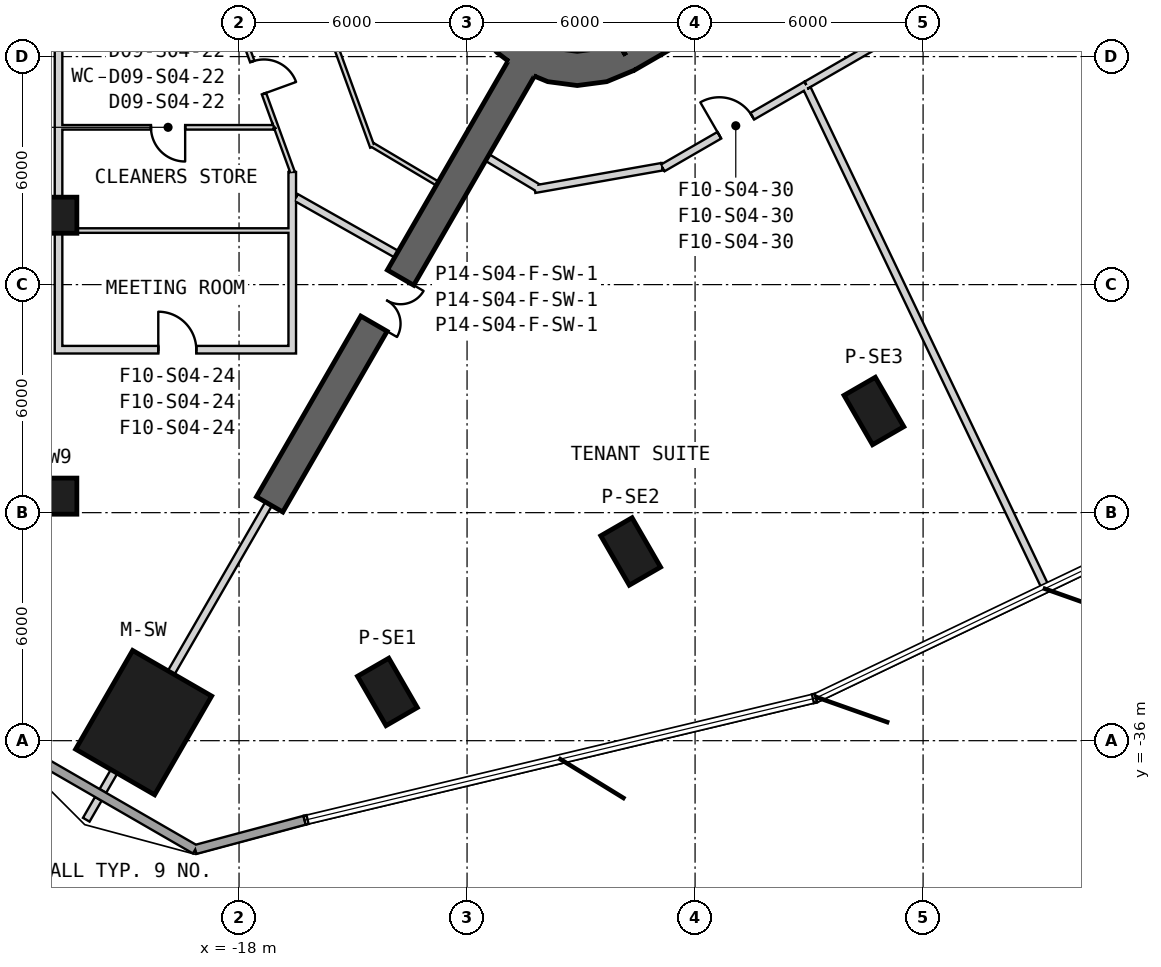
"""IFC4 building model, lengths in metres.
Left out: names, types, materials, properties, quantities, classifications, styles, units other than length and angle.
Written with IfcOpenShell. Run it as: python <this file> out.ifc"""

import sys

from ifc_helpers import new_model, si_unit, direction, frame, frame_2d, origin, origin_2d, place, context, subcontext, project, spatial, polyline, rectangle, outline, extrude, element, fill, save


model = new_model("IFC4")
c1 = context("Model", 3, precision=1e-05, world=origin(), true_north=direction((0.0, 1.0)))
c2 = subcontext(c1, "Body", "Model", "MODEL_VIEW")
j1 = project(units=[si_unit("LENGTHUNIT", "METRE"), si_unit("PLANEANGLEUNIT", "RADIAN")], contexts=[c1])
p1 = place(None, origin())
s1 = spatial("IfcSite", under=j1, at=p1, CompositionType="ELEMENT")
p2 = place(p1, origin())
s2 = spatial("IfcBuilding", under=s1, at=p2, CompositionType="ELEMENT")
p3 = place(p2, frame((0.0, 0.0, 94.7)))
s3 = spatial("IfcBuildingStorey", under=s2, at=p3, CompositionType="ELEMENT", Elevation=94.7)
p4 = place(p3, frame((-20.51, -35.525, 0.0), z_axis=(0.0, 0.0, 1.0), x_axis=(-0.5, -0.866025403784, 0.0)))
e1 = element("IfcColumn", 1, at=p4, inside=s3, PredefinedType="COLUMN", context=c2, shape_type="SweptSolid", body=[
    extrude(rectangle(XDim=3.0, YDim=2.4, at=origin_2d()), origin(), (0.0, 0.0, 1.0), 4.1),
])
for number, where, z_axis, x_axis in (
    (2, (-23.018, -22.174, 0.0), (0.0, 0.0, 1.0), (-1.0, 0.0, 0.0)),
    (3, (-23.018, -29.566, 0.0), (0.0, 0.0, 1.0), (-1.0, 0.0, 0.0)),
    (4, (-14.096, -34.717, 0.0), (0.0, 0.0, 1.0), (0.5, -0.866, 0.0)),
    (5, (-7.695, -31.021, 0.0), (0.0, 0.0, 1.0), (0.5, -0.866, 0.0)),
    (6, (-1.293, -27.326, 0.0), (0.0, 0.0, 1.0), (0.5, -0.866, 0.0)),
):
    element("IfcColumn", number, at=place(p3, frame(where, z_axis=z_axis, x_axis=x_axis)), inside=s3, PredefinedType="COLUMN", context=c2, shape_type="SweptSolid", body=[
        extrude(rectangle(XDim=1.5, YDim=0.95, at=origin_2d()), origin(), (0.0, 0.0, 1.0), 4.1),
    ])
p5 = place(p3, frame((-7.825, -17.97, 0.0), z_axis=(0.0, 0.0, 1.0), x_axis=(0.866028369851, 0.499994862586, 0.0)))
e7 = element("IfcWall", 7, at=p5, inside=s3, PredefinedType="SHEAR", context=c2, shape_type="SweptSolid", body=[
    extrude(rectangle(XDim=31.523, YDim=0.9, at=frame_2d((15.762, 0.0))), origin(), (0.0, 0.0, 1.0), 4.1),
])
p6 = place(p5, frame((7.062, 0.0, 0.0)))
e8 = element("IfcOpeningElement", 8, at=p6, cuts=e7, PredefinedType="OPENING", context=c2, shape_type="SweptSolid", body=[
    extrude(rectangle(XDim=1.2, YDim=2.4, at=frame_2d((0.6, 1.2))), frame((0.0, 0.46, 0.0), z_axis=(0.0, -1.0, 0.0), x_axis=(1.0, 0.0, 0.0)), (0.0, 0.0, 1.0), 0.92),
])
p7 = place(p5, frame((9.762, 0.0, 0.0)))
e9 = element("IfcOpeningElement", 9, at=p7, cuts=e7, PredefinedType="OPENING", context=c2, shape_type="SweptSolid", body=[
    extrude(rectangle(XDim=1.2, YDim=2.4, at=frame_2d((0.6, 1.2))), frame((0.0, 0.46, 0.0), z_axis=(0.0, -1.0, 0.0), x_axis=(1.0, 0.0, 0.0)), (0.0, 0.0, 1.0), 0.92),
])
p8 = place(p5, frame((12.462, 0.0, 0.0)))
e10 = element("IfcOpeningElement", 10, at=p8, cuts=e7, PredefinedType="OPENING", context=c2, shape_type="SweptSolid", body=[
    extrude(rectangle(XDim=1.2, YDim=2.4, at=frame_2d((0.6, 1.2))), frame((0.0, 0.46, 0.0), z_axis=(0.0, -1.0, 0.0), x_axis=(1.0, 0.0, 0.0)), (0.0, 0.0, 1.0), 0.92),
])
p9 = place(p5, frame((15.162, 0.0, 0.0)))
e11 = element("IfcOpeningElement", 11, at=p9, cuts=e7, PredefinedType="OPENING", context=c2, shape_type="SweptSolid", body=[
    extrude(rectangle(XDim=1.2, YDim=2.4, at=frame_2d((0.6, 1.2))), frame((0.0, 0.46, 0.0), z_axis=(0.0, -1.0, 0.0), x_axis=(1.0, 0.0, 0.0)), (0.0, 0.0, 1.0), 0.92),
])
p10 = place(p5, frame((17.862, 0.0, 0.0)))
e12 = element("IfcOpeningElement", 12, at=p10, cuts=e7, PredefinedType="OPENING", context=c2, shape_type="SweptSolid", body=[
    extrude(rectangle(XDim=1.2, YDim=2.4, at=frame_2d((0.6, 1.2))), frame((0.0, 0.46, 0.0), z_axis=(0.0, -1.0, 0.0), x_axis=(1.0, 0.0, 0.0)), (0.0, 0.0, 1.0), 0.92),
])
p11 = place(p5, frame((20.562, 0.0, 0.0)))
e13 = element("IfcOpeningElement", 13, at=p11, cuts=e7, PredefinedType="OPENING", context=c2, shape_type="SweptSolid", body=[
    extrude(rectangle(XDim=1.2, YDim=2.4, at=frame_2d((0.6, 1.2))), frame((0.0, 0.46, 0.0), z_axis=(0.0, -1.0, 0.0), x_axis=(1.0, 0.0, 0.0)), (0.0, 0.0, 1.0), 0.92),
])
p12 = place(p5, frame((26.712, 0.0, 0.0)))
e14 = element("IfcOpeningElement", 14, at=p12, cuts=e7, PredefinedType="OPENING", context=c2, shape_type="SweptSolid", body=[
    extrude(rectangle(XDim=1.2, YDim=2.4, at=frame_2d((0.6, 1.2))), frame((0.0, 0.46, 0.0), z_axis=(0.0, -1.0, 0.0), x_axis=(1.0, 0.0, 0.0)), (0.0, 0.0, 1.0), 0.92),
])
p13 = place(p5, frame((3.612, 0.0, 0.0)))
e15 = element("IfcOpeningElement", 15, at=p13, cuts=e7, PredefinedType="OPENING", context=c2, shape_type="SweptSolid", body=[
    extrude(rectangle(XDim=1.2, YDim=2.4, at=frame_2d((0.6, 1.2))), frame((0.0, 0.46, 0.0), z_axis=(0.0, -1.0, 0.0), x_axis=(1.0, 0.0, 0.0)), (0.0, 0.0, 1.0), 0.92),
])
p14 = place(p3, origin())
e16 = element("IfcWall", 16, at=p14, inside=s3, PredefinedType="SHEAR", context=c2, shape_type="SweptSolid", body=[
    extrude(outline(polyline([(-12.1, -15.762), (-11.998, -16.538), (-11.698, -17.262), (-11.221, -17.883), (-10.6, -18.36), (-9.876, -18.659), (-9.1, -18.762), (-8.323, -18.659), (-7.6, -18.36), (-8.05, -17.58), (-8.556, -17.79), (-9.1, -17.862), (-9.644, -17.79), (-10.15, -17.58), (-10.585, -17.247), (-10.919, -16.812), (-11.128, -16.305), (-11.2, -15.762), (-12.1, -15.762)])), origin(), (0.0, 0.0, 1.0), 4.1),
])
p15 = place(p3, frame((-10.575, -18.316, 0.0), z_axis=(0.0, 0.0, 1.0), x_axis=(-0.500006018292, -0.866021929094, 0.0)))
e17 = element("IfcWall", 17, at=p15, inside=s3, PredefinedType="SHEAR", context=c2, shape_type="SweptSolid", body=[
    extrude(rectangle(XDim=13.241, YDim=0.8, at=frame_2d((6.621, 0.0))), origin(), (0.0, 0.0, 1.0), 4.1),
])
p16 = place(p15, frame((6.35, 0.0, 0.0)))
e18 = element("IfcOpeningElement", 18, at=p16, cuts=e17, PredefinedType="OPENING", context=c2, shape_type="SweptSolid", body=[
    extrude(rectangle(XDim=1.4, YDim=2.4, at=frame_2d((0.7, 1.2))), frame((0.0, 0.41, 0.0), z_axis=(0.0, -1.0, 0.0), x_axis=(1.0, 0.0, 0.0)), (0.0, 0.0, 1.0), 0.82),
])
p17 = place(p3, frame((-24.081, -36.019, 0.0), z_axis=(0.0, 0.0, 1.0), x_axis=(0.866024844342, -0.500000968981, 0.0)))
e19 = element("IfcWall", 19, at=p17, inside=s3, PredefinedType="SOLIDWALL", context=c2, shape_type="SweptSolid", body=[
    extrude(rectangle(XDim=5.691, YDim=0.24, at=frame_2d((2.845, 0.0))), origin(), (0.0, 0.0, 1.0), 3.8),
])
p18 = place(p3, frame((-19.153, -38.865, 0.0), z_axis=(0.0, 0.0, 1.0), x_axis=(0.965922815746, 0.258830280341, 0.0)))
e20 = element("IfcWall", 20, at=p18, inside=s3, PredefinedType="SOLIDWALL", context=c2, shape_type="SweptSolid", body=[
    extrude(rectangle(XDim=2.98, YDim=0.24, at=frame_2d((1.49, 0.0))), origin(), (0.0, 0.0, 1.0), 3.8),
])
p19 = place(p3, frame((-15.879, -16.567, 0.0), z_axis=(0.0, 0.0, 1.0), x_axis=(0.341999322503, -0.939700198685, 0.0)))
e21 = element("IfcWall", 21, at=p19, inside=s3, PredefinedType="PARTITIONING", context=c2, shape_type="SweptSolid", body=[
    extrude(rectangle(XDim=4.054, YDim=0.12, at=frame_2d((2.027, 0.0))), origin(), (0.0, 0.0, 1.0), 2.88),
])
p20 = place(p3, frame((-14.494, -20.322, 0.0), z_axis=(0.0, 0.0, 1.0), x_axis=(0.859745408261, -0.510722853389, 0.0)))
e22 = element("IfcWall", 22, at=p20, inside=s3, PredefinedType="PARTITIONING", context=c2, shape_type="SweptSolid", body=[
    extrude(rectangle(XDim=1.991, YDim=0.12, at=frame_2d((0.996, 0.0))), origin(), (0.0, 0.0, 1.0), 3.8),
])
p21 = place(p3, frame((-16.5, -21.706, 0.0), z_axis=(0.0, 0.0, 1.0), x_axis=(0.870637705421, -0.491924776668, 0.0)))
e23 = element("IfcWall", 23, at=p21, inside=s3, PredefinedType="PARTITIONING", context=c2, shape_type="SweptSolid", body=[
    extrude(rectangle(XDim=3.036, YDim=0.2, at=frame_2d((1.518, 0.0))), origin(), (0.0, 0.0, 1.0), 3.8),
])
p22 = place(p3, frame((-17.992, -17.196, 0.0), z_axis=(0.0, 0.0, 1.0), x_axis=(0.341997880797, -0.939700723385, 0.0)))
e24 = element("IfcWall", 24, at=p22, inside=s3, PredefinedType="PARTITIONING", context=c2, shape_type="SweptSolid", body=[
    extrude(rectangle(XDim=2.846, YDim=0.12, at=frame_2d((1.423, 0.0))), origin(), (0.0, 0.0, 1.0), 2.98),
])
p23 = place(p22, frame((0.994, 0.0, 0.0)))
e25 = element("IfcOpeningElement", 25, at=p23, cuts=e24, PredefinedType="OPENING", context=c2, shape_type="SweptSolid", body=[
    extrude(rectangle(XDim=0.9, YDim=2.1, at=frame_2d((0.45, 1.05))), frame((0.0, 0.07, 0.0), z_axis=(0.0, -1.0, 0.0), x_axis=(1.0, 0.0, 0.0)), (0.0, 0.0, 1.0), 0.14),
])
p24 = place(p3, frame((-17.019, -19.87, 0.0), z_axis=(0.0, 0.0, 1.0), x_axis=(0.341976406316, -0.939708538603, 0.0)))
e26 = element("IfcWall", 26, at=p24, inside=s3, PredefinedType="PARTITIONING", context=c2, shape_type="SweptSolid", body=[
    extrude(rectangle(XDim=1.26, YDim=0.12, at=frame_2d((0.63, 0.0))), origin(), (0.0, 0.0, 1.0), 2.88),
])
p25 = place(p3, frame((-6.852, -20.93, 0.0), z_axis=(0.0, 0.0, 1.0), x_axis=(0.865997465245, 0.500048387848, 0.0)))
e27 = element("IfcWall", 27, at=p25, inside=s3, PredefinedType="PARTITIONING", context=c2, shape_type="SweptSolid", body=[
    extrude(rectangle(XDim=4.366, YDim=0.2, at=frame_2d((2.183, 0.0))), origin(), (0.0, 0.0, 1.0), 2.98),
])
p26 = place(p25, frame((1.721, 0.0, 0.0)))
e28 = element("IfcOpeningElement", 28, at=p26, cuts=e27, PredefinedType="OPENING", context=c2, shape_type="SweptSolid", body=[
    extrude(rectangle(XDim=1.0, YDim=2.1, at=frame_2d((0.5, 1.05))), frame((0.0, 0.11, 0.0), z_axis=(0.0, -1.0, 0.0), x_axis=(1.0, 0.0, 0.0)), (0.0, 0.0, 1.0), 0.22),
])
p27 = place(p3, frame((-3.072, -18.747, 0.0), z_axis=(0.0, 0.0, 1.0), x_axis=(0.866027760718, 0.499995917648, 0.0)))
e29 = element("IfcWall", 29, at=p27, inside=s3, PredefinedType="PARTITIONING", context=c2, shape_type="SweptSolid", body=[
    extrude(rectangle(XDim=28.233, YDim=0.2, at=frame_2d((14.117, 0.0))), origin(), (0.0, 0.0, 1.0), 2.98),
])
p28 = place(p27, frame((13.617, 0.0, 0.0)))
e30 = element("IfcOpeningElement", 30, at=p28, cuts=e29, PredefinedType="OPENING", context=c2, shape_type="SweptSolid", body=[
    extrude(rectangle(XDim=1.0, YDim=2.1, at=frame_2d((0.5, 1.05))), frame((0.0, 0.11, 0.0), z_axis=(0.0, -1.0, 0.0), x_axis=(1.0, 0.0, 0.0)), (0.0, 0.0, 1.0), 0.22),
])
p29 = place(p3, frame((-10.22, -21.49, 0.0), z_axis=(0.0, 0.0, 1.0), x_axis=(0.984805188344, 0.173662721995, 0.0)))
e31 = element("IfcWall", 31, at=p29, inside=s3, PredefinedType="PARTITIONING", context=c2, shape_type="SweptSolid", body=[
    extrude(rectangle(XDim=3.408, YDim=0.2, at=frame_2d((1.704, 0.0))), origin(), (0.0, 0.0, 1.0), 2.88),
])
p30 = place(p3, frame((-11.465, -20.657, 0.0), z_axis=(0.0, 0.0, 1.0), x_axis=(0.858376755127, -0.513019830276, 0.0)))
e32 = element("IfcWall", 32, at=p30, inside=s3, PredefinedType="PARTITIONING", context=c2, shape_type="SweptSolid", body=[
    extrude(rectangle(XDim=1.533, YDim=0.2, at=frame_2d((0.767, 0.0))), origin(), (0.0, 0.0, 1.0), 3.8),
])
p31 = place(p3, frame((-22.02, -38.08, 0.0), z_axis=(0.0, 0.0, 1.0), x_axis=(0.499988999718, 0.866031754707, 0.0)))
e33 = element("IfcWall", 33, at=p31, inside=s3, PredefinedType="PARTITIONING", context=c2, shape_type="SweptSolid", body=[
    extrude(rectangle(XDim=0.634, YDim=0.2, at=frame_2d((0.317, 0.0))), origin(), (0.0, 0.0, 1.0), 3.8),
])
p32 = place(p3, frame((-21.583, -37.323, 0.0), z_axis=(0.0, 0.0, 1.0), x_axis=(0.500078724409, 0.865979947454, 0.0)))
e34 = element("IfcWall", 34, at=p32, inside=s3, PredefinedType="PARTITIONING", context=c2, shape_type="SweptSolid", body=[
    extrude(rectangle(XDim=0.593, YDim=0.2, at=frame_2d((0.297, 0.0))), origin(), (0.0, 0.0, 1.0), 3.8),
])
p33 = place(p3, frame((-19.786, -34.211, 0.0), z_axis=(0.0, 0.0, 1.0), x_axis=(0.499998470576, 0.866026286796, 0.0)))
e35 = element("IfcWall", 35, at=p33, inside=s3, PredefinedType="PARTITIONING", context=c2, shape_type="SweptSolid", body=[
    extrude(rectangle(XDim=5.13, YDim=0.2, at=frame_2d((2.565, 0.0))), origin(), (0.0, 0.0, 1.0), 3.37),
])
p34 = place(p3, frame((-16.6, -25.613, 0.0), z_axis=(0.0, 0.0, 1.0), x_axis=(0.0, 1.0, 0.0)))
e36 = element("IfcWall", 36, at=p34, inside=s3, PredefinedType="PARTITIONING", context=c2, shape_type="SweptSolid", body=[
    extrude(rectangle(XDim=3.035, YDim=0.2, at=frame_2d((1.518, 0.0))), origin(), (0.0, 0.0, 1.0), 3.8),
])
p35 = place(p3, frame((-16.6, -22.577, 0.0), z_axis=(0.0, 0.0, 1.0), x_axis=(0.0, 1.0, 0.0)))
e37 = element("IfcWall", 37, at=p35, inside=s3, PredefinedType="PARTITIONING", context=c2, shape_type="SweptSolid", body=[
    extrude(rectangle(XDim=1.542, YDim=0.2, at=frame_2d((0.771, 0.0))), origin(), (0.0, 0.0, 1.0), 2.88),
])
p36 = place(p3, frame((-22.75, -25.812, 0.0), z_axis=(0.0, 0.0, 1.0), x_axis=(0.0, 1.0, 0.0)))
e38 = element("IfcWall", 38, at=p36, inside=s3, PredefinedType="PARTITIONING", context=c2, shape_type="SweptSolid", body=[
    extrude(rectangle(XDim=3.235, YDim=0.2, at=frame_2d((1.618, 0.0))), origin(), (0.0, 0.0, 1.0), 3.8),
])
p37 = place(p3, frame((-22.75, -22.577, 0.0), z_axis=(0.0, 0.0, 1.0), x_axis=(0.0, 1.0, 0.0)))
e39 = element("IfcWall", 39, at=p37, inside=s3, PredefinedType="PARTITIONING", context=c2, shape_type="SweptSolid", body=[
    extrude(rectangle(XDim=2.717, YDim=0.2, at=frame_2d((1.358, 0.0))), origin(), (0.0, 0.0, 1.0), 3.8),
])
p38 = place(p3, frame((-22.75, -19.861, 0.0), z_axis=(0.0, 0.0, 1.0), x_axis=(0.0, 1.0, 0.0)))
e40 = element("IfcWall", 40, at=p38, inside=s3, PredefinedType="PARTITIONING", context=c2, shape_type="SweptSolid", body=[
    extrude(rectangle(XDim=2.626, YDim=0.2, at=frame_2d((1.313, 0.0))), origin(), (0.0, 0.0, 1.0), 3.8),
])
p39 = place(p3, frame((-22.65, -25.712, 0.0), z_axis=(0.0, 0.0, 1.0), x_axis=(1.0, 0.0, 0.0)))
e41 = element("IfcWall", 41, at=p39, inside=s3, PredefinedType="PARTITIONING", context=c2, shape_type="SweptSolid", body=[
    extrude(rectangle(XDim=6.15, YDim=0.2, at=frame_2d((3.075, 0.0))), origin(), (0.0, 0.0, 1.0), 2.88),
])
p40 = place(p39, frame((2.525, 0.0, 0.0)))
e42 = element("IfcOpeningElement", 42, at=p40, cuts=e41, PredefinedType="OPENING", context=c2, shape_type="SweptSolid", body=[
    extrude(rectangle(XDim=1.0, YDim=2.1, at=frame_2d((0.5, 1.05))), frame((0.0, 0.11, 0.0), z_axis=(0.0, -1.0, 0.0), x_axis=(1.0, 0.0, 0.0)), (0.0, 0.0, 1.0), 0.22),
])
p41 = place(p3, frame((-3.049, -18.85, 0.0), z_axis=(0.0, 0.0, 1.0), x_axis=(0.431079326347, -0.902314033137, 0.0)))
e43 = element("IfcWall", 43, at=p41, inside=s3, PredefinedType="PARTITIONING", context=c2, shape_type="SweptSolid", body=[
    extrude(rectangle(XDim=14.561, YDim=0.2, at=frame_2d((7.281, 0.0))), origin(), (0.0, 0.0, 1.0), 3.08),
])
p42 = place(p3, frame((-17.086, -19.861, 0.0), z_axis=(0.0, 0.0, 1.0), x_axis=(-1.0, 0.0, 0.0)))
e44 = element("IfcWall", 44, at=p42, inside=s3, PredefinedType="PARTITIONING", context=c2, shape_type="SweptSolid", body=[
    extrude(rectangle(XDim=5.564, YDim=0.12, at=frame_2d((2.782, 0.0))), origin(), (0.0, 0.0, 1.0), 2.98),
])
p43 = place(p42, frame((2.332, 0.0, 0.0)))
e45 = element("IfcOpeningElement", 45, at=p43, cuts=e44, PredefinedType="OPENING", context=c2, shape_type="SweptSolid", body=[
    extrude(rectangle(XDim=0.9, YDim=2.1, at=frame_2d((0.45, 1.05))), frame((0.0, 0.07, 0.0), z_axis=(0.0, -1.0, 0.0), x_axis=(1.0, 0.0, 0.0)), (0.0, 0.0, 1.0), 0.14),
])
p44 = place(p3, frame((-16.7, -22.577, 0.0), z_axis=(0.0, 0.0, 1.0), x_axis=(-1.0, 0.0, 0.0)))
e46 = element("IfcWall", 46, at=p44, inside=s3, PredefinedType="PARTITIONING", context=c2, shape_type="SweptSolid", body=[
    extrude(rectangle(XDim=5.95, YDim=0.12, at=frame_2d((2.975, 0.0))), origin(), (0.0, 0.0, 1.0), 2.88),
])
p45 = place(p23, origin())
e47 = element("IfcDoor", 47, at=p45, inside=s3, OperationType="SINGLE_SWING_LEFT", PredefinedType="NOTDEFINED", context=c2, shape_type="SweptSolid", body=[
    extrude(rectangle(XDim=0.9, YDim=2.1, at=frame_2d((0.45, 1.05))), frame((0.0, 0.025, 0.0), z_axis=(0.0, -1.0, 0.0), x_axis=(1.0, 0.0, 0.0)), (0.0, 0.0, 1.0), 0.05),
])
fill(e25, e47)
p46 = place(p43, origin())
e48 = element("IfcDoor", 48, at=p46, inside=s3, OperationType="SINGLE_SWING_LEFT", PredefinedType="NOTDEFINED", context=c2, shape_type="SweptSolid", body=[
    extrude(rectangle(XDim=0.9, YDim=2.1, at=frame_2d((0.45, 1.05))), frame((0.0, 0.025, 0.0), z_axis=(0.0, -1.0, 0.0), x_axis=(1.0, 0.0, 0.0)), (0.0, 0.0, 1.0), 0.05),
])
fill(e45, e48)
p47 = place(p40, origin())
e49 = element("IfcDoor", 49, at=p47, inside=s3, OperationType="SINGLE_SWING_LEFT", PredefinedType="USERDEFINED", context=c2, shape_type="SweptSolid", body=[
    extrude(rectangle(XDim=1.0, YDim=2.1, at=frame_2d((0.5, 1.05))), frame((0.0, 0.025, 0.0), z_axis=(0.0, -1.0, 0.0), x_axis=(1.0, 0.0, 0.0)), (0.0, 0.0, 1.0), 0.05),
])
fill(e42, e49)
p48 = place(p26, origin())
e50 = element("IfcDoor", 50, at=p48, inside=s3, OperationType="SINGLE_SWING_RIGHT", PredefinedType="USERDEFINED", context=c2, shape_type="SweptSolid", body=[
    extrude(rectangle(XDim=1.0, YDim=2.1, at=frame_2d((0.5, 1.05))), frame((0.0, 0.025, 0.0), z_axis=(0.0, -1.0, 0.0), x_axis=(1.0, 0.0, 0.0)), (0.0, 0.0, 1.0), 0.05),
])
fill(e28, e50)
p49 = place(p16, origin())
e51 = element("IfcDoor", 51, at=p49, inside=s3, OperationType="DOUBLE_DOOR_SINGLE_SWING", PredefinedType="NOTDEFINED", context=c2, shape_type="SweptSolid", body=[
    extrude(rectangle(XDim=1.4, YDim=2.4, at=frame_2d((0.7, 1.2))), frame((0.0, 0.025, 0.0), z_axis=(0.0, -1.0, 0.0), x_axis=(1.0, 0.0, 0.0)), (0.0, 0.0, 1.0), 0.05),
])
fill(e18, e51)
save(model, sys.argv[1])
